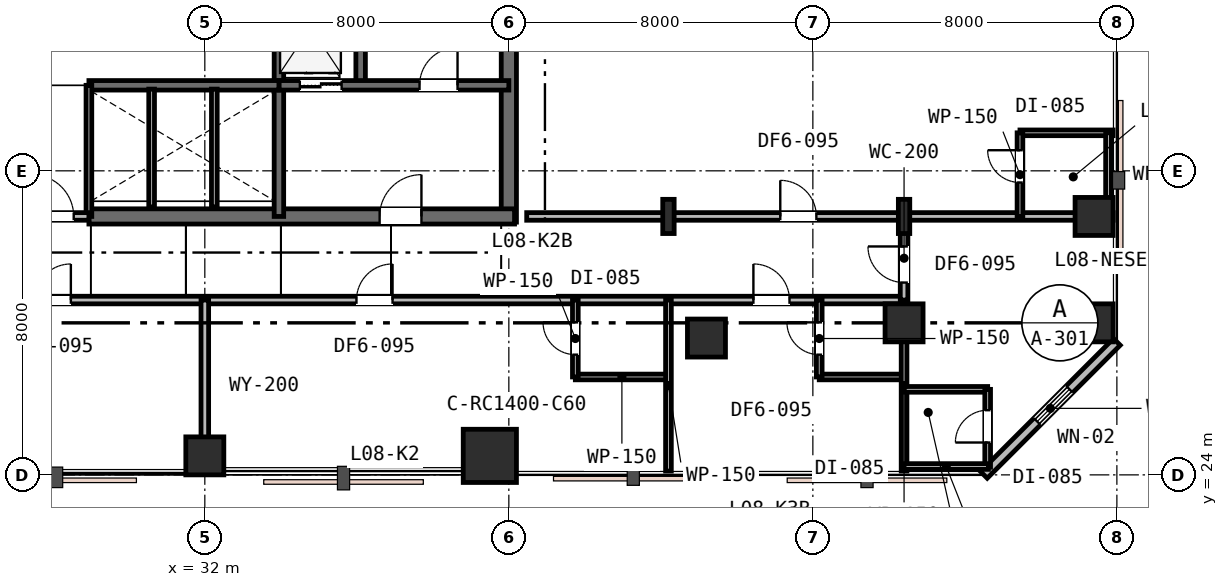
"""IFC4 building model, lengths in metres.
Left out: names, types, materials, properties, quantities, classifications, styles, units other than length and angle.
Written with IfcOpenShell. Run it as: python <this file> out.ifc"""

import sys

from ifc_helpers import new_model, si_unit, direction, frame, frame_2d, origin, origin_2d, place, context, subcontext, project, spatial, rectangle, i_section, extrude, element, fill, save


model = new_model("IFC4")
c1 = context("Model", 3, precision=1e-05, world=origin(), true_north=direction((0.0, 1.0)))
c2 = subcontext(c1, "Body", "Model", "MODEL_VIEW")
j1 = project(units=[si_unit("LENGTHUNIT", "METRE"), si_unit("PLANEANGLEUNIT", "RADIAN")], contexts=[c1])
p1 = place(None, origin())
s1 = spatial("IfcSite", under=j1, at=p1, CompositionType="ELEMENT")
p2 = place(p1, origin())
s2 = spatial("IfcBuilding", under=s1, at=p2, CompositionType="ELEMENT")
p3 = place(p2, frame((0.0, 0.0, 36.6)))
s3 = spatial("IfcBuildingStorey", under=s2, at=p3, CompositionType="ELEMENT", Elevation=36.6)
p4 = place(p3, frame((40.0, 30.65, 0.0), z_axis=(0.0, 0.0, 1.0), x_axis=(0.0, 1.0, 0.0)))
e1 = element("IfcWall", 1, at=p4, inside=s3, PredefinedType="SHEAR", context=c2, shape_type="SweptSolid", body=[
    extrude(rectangle(XDim=12.3, YDim=0.4, at=frame_2d((6.15, 0.0))), origin(), (0.0, 0.0, 1.0), 3.6),
])
p5 = place(p3, frame((28.95, 30.8, 0.0), z_axis=(0.0, 0.0, 1.0), x_axis=(1.0, 0.0, 0.0)))
e2 = element("IfcWall", 2, at=p5, inside=s3, PredefinedType="SHEAR", context=c2, shape_type="SweptSolid", body=[
    extrude(rectangle(XDim=11.2, YDim=0.4, at=frame_2d((5.6, 0.0))), origin(), (0.0, 0.0, 1.0), 3.6),
])
p6 = place(p5, frame((7.65, 0.0, 0.0)))
e3 = element("IfcOpeningElement", 3, at=p6, cuts=e2, PredefinedType="OPENING", context=c2, shape_type="SweptSolid", body=[
    extrude(rectangle(XDim=1.1, YDim=2.15, at=frame_2d((0.55, 1.075))), frame((0.0, 0.21, 0.0), z_axis=(0.0, -1.0, 0.0), x_axis=(1.0, 0.0, 0.0)), (0.0, 0.0, 1.0), 0.42),
])
p7 = place(p3, frame((36.1, 34.25, 0.0), z_axis=(0.0, 0.0, 1.0), x_axis=(0.0, 1.0, 0.0)))
e4 = element("IfcWall", 4, at=p7, inside=s3, PredefinedType="SHEAR", context=c2, shape_type="SweptSolid", body=[
    extrude(rectangle(XDim=8.65, YDim=0.25, at=frame_2d((4.325, 0.0))), origin(), (0.0, 0.0, 1.0), 3.6),
])
p8 = place(p3, frame((33.95, 30.8, 0.0), z_axis=(0.0, 0.0, 1.0), x_axis=(0.0, 1.0, 0.0)))
e5 = element("IfcWall", 5, at=p8, inside=s3, PredefinedType="SHEAR", context=c2, shape_type="SweptSolid", body=[
    extrude(rectangle(XDim=6.45, YDim=0.25, at=frame_2d((3.225, 0.0))), origin(), (0.0, 0.0, 1.0), 3.6),
])
p9 = place(p3, frame((33.95, 34.25, 0.0), z_axis=(0.0, 0.0, 1.0), x_axis=(1.0, 0.0, 0.0)))
e6 = element("IfcWall", 6, at=p9, inside=s3, PredefinedType="SHEAR", context=c2, shape_type="SweptSolid", body=[
    extrude(rectangle(XDim=6.05, YDim=0.25, at=frame_2d((3.025, 0.0))), origin(), (0.0, 0.0, 1.0), 3.6),
])
p10 = place(p9, frame((3.7, 0.0, 0.0)))
e7 = element("IfcOpeningElement", 7, at=p10, cuts=e6, PredefinedType="OPENING", context=c2, shape_type="SweptSolid", body=[
    extrude(rectangle(XDim=1.0, YDim=2.15, at=frame_2d((0.5, 1.075))), frame((0.0, 0.135, 0.0), z_axis=(0.0, -1.0, 0.0), x_axis=(1.0, 0.0, 0.0)), (0.0, 0.0, 1.0), 0.27),
])
p11 = place(p9, frame((0.55, 0.0, 0.0)))
e8 = element("IfcOpeningElement", 8, at=p11, cuts=e6, PredefinedType="OPENING", context=c2, shape_type="SweptSolid", body=[
    extrude(rectangle(XDim=1.1, YDim=2.15, at=frame_2d((0.55, 1.075))), frame((0.0, 0.135, 0.0), z_axis=(0.0, -1.0, 0.0), x_axis=(1.0, 0.0, 0.0)), (0.0, 0.0, 1.0), 0.27),
])
p12 = place(p3, frame((28.95, 34.25, 0.0), z_axis=(0.0, 0.0, 1.0), x_axis=(1.0, 0.0, 0.0)))
e9 = element("IfcWall", 9, at=p12, inside=s3, PredefinedType="SHEAR", context=c2, shape_type="SweptSolid", body=[
    extrude(rectangle(XDim=5.0, YDim=0.25, at=frame_2d((2.5, 0.0))), origin(), (0.0, 0.0, 1.0), 3.6),
])
p13 = place(p3, frame((32.0, 24.5, 0.0), z_axis=(0.0, 0.0, 1.0), x_axis=(1.0, 0.0, 0.0)))
e10 = element("IfcColumn", 10, at=p13, inside=s3, PredefinedType="COLUMN", context=c2, shape_type="SweptSolid", body=[
    extrude(rectangle(XDim=1.0, YDim=1.0, at=origin_2d()), origin(), (0.0, 0.0, 1.0), 3.6),
])
p14 = place(p3, frame((39.5, 24.5, 0.0), z_axis=(0.0, 0.0, 1.0), x_axis=(1.0, 0.0, 0.0)))
e11 = element("IfcColumn", 11, at=p14, inside=s3, PredefinedType="COLUMN", context=c2, shape_type="SweptSolid", body=[
    extrude(rectangle(XDim=1.4, YDim=1.4, at=origin_2d()), origin(), (0.0, 0.0, 1.0), 3.6),
])
for number, where, z_axis, x_axis in (
    (12, (45.2, 27.6, 0.0), (0.0, 0.0, 1.0), (1.0, 0.0, 0.0)),
    (13, (50.4, 28.0, 0.0), (0.0, 0.0, 1.0), (1.0, 0.0, 0.0)),
    (14, (55.4, 28.0, 0.0), (0.0, 0.0, 1.0), (1.0, 0.0, 0.0)),
    (15, (55.4, 30.8, 0.0), (0.0, 0.0, 1.0), (1.0, 0.0, 0.0)),
):
    element("IfcColumn", number, at=place(p3, frame(where, z_axis=z_axis, x_axis=x_axis)), inside=s3, PredefinedType="COLUMN", context=c2, shape_type="SweptSolid", body=[
        extrude(rectangle(XDim=1.0, YDim=1.0, at=origin_2d()), origin(), (0.0, 0.0, 1.0), 3.6),
    ])
for number, where, z_axis, x_axis in (
    (16, (44.2, 30.8, 0.0), (0.0, 0.0, 1.0), (1.0, 0.0, 0.0)),
    (17, (50.4, 30.8, 0.0), (0.0, 0.0, 1.0), (1.0, 0.0, 0.0)),
):
    element("IfcColumn", number, at=place(p3, frame(where, z_axis=z_axis, x_axis=x_axis)), inside=s3, PredefinedType="COLUMN", context=c2, shape_type="SweptSolid", body=[
        extrude(i_section(OverallWidth=0.3, OverallDepth=0.9, WebThickness=0.018, FlangeThickness=0.035, FilletRadius=0.03, at=origin_2d()), origin(), (0.0, 0.0, 1.0), 3.6),
    ])
p15 = place(p3, frame((52.5, 24.0, 0.0), z_axis=(0.0, 0.0, 1.0), x_axis=(0.707106781187, 0.707106781187, 0.0)))
e18 = element("IfcWall", 18, at=p15, inside=s3, PredefinedType="STANDARD", context=c2, shape_type="SweptSolid", body=[
    extrude(rectangle(XDim=4.95, YDim=0.25, at=frame_2d((2.475, 0.0))), origin(), (0.0, 0.0, 1.0), 3.33),
])
p16 = place(p15, frame((1.985, 0.0, 0.85)))
e19 = element("IfcOpeningElement", 19, at=p16, cuts=e18, PredefinedType="OPENING", context=c2, shape_type="SweptSolid", body=[
    extrude(rectangle(XDim=1.2, YDim=1.6, at=frame_2d((0.6, 0.8))), frame((0.0, 0.135, 0.0), z_axis=(0.0, -1.0, 0.0), x_axis=(1.0, 0.0, 0.0)), (0.0, 0.0, 1.0), 0.27),
])
p17 = place(p3, frame((28.95, 30.8, 0.0), z_axis=(0.0, 0.0, 1.0), x_axis=(0.0, 1.0, 0.0)))
e20 = element("IfcWall", 20, at=p17, inside=s3, PredefinedType="PLUMBINGWALL", context=c2, shape_type="SweptSolid", body=[
    extrude(rectangle(XDim=3.45, YDim=0.15, at=frame_2d((1.725, 0.0))), origin(), (0.0, 0.0, 1.0), 3.33),
])
p18 = place(p3, frame((27.05, 30.8, 0.0), z_axis=(0.0, 0.0, 1.0), x_axis=(1.0, 0.0, 0.0)))
e21 = element("IfcWall", 21, at=p18, inside=s3, PredefinedType="PARTITIONING", context=c2, shape_type="SweptSolid", body=[
    extrude(rectangle(XDim=1.9, YDim=0.2, at=frame_2d((0.95, 0.0))), origin(), (0.0, 0.0, 1.0), 3.33),
])
p19 = place(p18, frame((0.4, 0.0, 0.0)))
e22 = element("IfcOpeningElement", 22, at=p19, cuts=e21, PredefinedType="OPENING", context=c2, shape_type="SweptSolid", body=[
    extrude(rectangle(XDim=1.1, YDim=2.15, at=frame_2d((0.55, 1.075))), frame((0.0, 0.11, 0.0), z_axis=(0.0, -1.0, 0.0), x_axis=(1.0, 0.0, 0.0)), (0.0, 0.0, 1.0), 0.22),
])
for number, where, z_axis, x_axis in (
    (23, (30.6, 31.05, 0.0), (0.0, 0.0, 1.0), (0.0, 1.0, 0.0)),
    (24, (32.25, 31.05, 0.0), (0.0, 0.0, 1.0), (0.0, 1.0, 0.0)),
):
    element("IfcWall", number, at=place(p3, frame(where, z_axis=z_axis, x_axis=x_axis)), inside=s3, PredefinedType="PLUMBINGWALL", context=c2, shape_type="SweptSolid", body=[
        extrude(rectangle(XDim=3.1, YDim=0.15, at=frame_2d((1.55, 0.0))), origin(), (0.0, 0.0, 1.0), 3.33),
    ])
p20 = place(p3, frame((19.6, 28.6, 0.0), z_axis=(0.0, 0.0, 1.0), x_axis=(1.0, 0.0, 0.0)))
e25 = element("IfcWall", 25, at=p20, inside=s3, PredefinedType="PARTITIONING", context=c2, shape_type="SweptSolid", body=[
    extrude(rectangle(XDim=30.8, YDim=0.2, at=frame_2d((15.4, 0.0))), origin(), (0.0, 0.0, 1.0), 2.82),
])
p21 = place(p20, frame((7.925, 0.0, 0.0)))
e26 = element("IfcOpeningElement", 26, at=p21, cuts=e25, PredefinedType="OPENING", context=c2, shape_type="SweptSolid", body=[
    extrude(rectangle(XDim=0.95, YDim=2.15, at=frame_2d((0.475, 1.075))), frame((0.0, 0.11, 0.0), z_axis=(0.0, -1.0, 0.0), x_axis=(1.0, 0.0, 0.0)), (0.0, 0.0, 1.0), 0.22),
])
p22 = place(p20, frame((16.39, 0.0, 0.0)))
e27 = element("IfcOpeningElement", 27, at=p22, cuts=e25, PredefinedType="OPENING", context=c2, shape_type="SweptSolid", body=[
    extrude(rectangle(XDim=0.95, YDim=2.15, at=frame_2d((0.475, 1.075))), frame((0.0, 0.11, 0.0), z_axis=(0.0, -1.0, 0.0), x_axis=(1.0, 0.0, 0.0)), (0.0, 0.0, 1.0), 0.22),
])
p23 = place(p20, frame((26.835, 0.0, 0.0)))
e28 = element("IfcOpeningElement", 28, at=p23, cuts=e25, PredefinedType="OPENING", context=c2, shape_type="SweptSolid", body=[
    extrude(rectangle(XDim=0.95, YDim=2.15, at=frame_2d((0.475, 1.075))), frame((0.0, 0.11, 0.0), z_axis=(0.0, -1.0, 0.0), x_axis=(1.0, 0.0, 0.0)), (0.0, 0.0, 1.0), 0.22),
])
p24 = place(p3, frame((32.0, 24.1, 0.0), z_axis=(0.0, 0.0, 1.0), x_axis=(0.0, 1.0, 0.0)))
e29 = element("IfcWall", 29, at=p24, inside=s3, PredefinedType="PARTITIONING", context=c2, shape_type="SweptSolid", body=[
    extrude(rectangle(XDim=4.5, YDim=0.2, at=frame_2d((2.25, 0.0))), origin(), (0.0, 0.0, 1.0), 2.93),
])
p25 = place(p3, frame((41.75, 26.576, 0.0), z_axis=(0.0, 0.0, 1.0), x_axis=(1.0, 0.0, 0.0)))
e30 = element("IfcWall", 30, at=p25, inside=s3, PredefinedType="PARTITIONING", context=c2, shape_type="SweptSolid", body=[
    extrude(rectangle(XDim=2.45, YDim=0.15, at=frame_2d((1.225, 0.0))), origin(), (0.0, 0.0, 1.0), 3.33),
])
p26 = place(p3, frame((41.75, 26.576, 0.0), z_axis=(0.0, 0.0, 1.0), x_axis=(0.0, 1.0, 0.0)))
e31 = element("IfcWall", 31, at=p26, inside=s3, PredefinedType="PARTITIONING", context=c2, shape_type="SweptSolid", body=[
    extrude(rectangle(XDim=2.024, YDim=0.15, at=frame_2d((1.012, 0.0))), origin(), (0.0, 0.0, 1.0), 3.33),
])
p27 = place(p26, frame((0.587, 0.0, 0.0)))
e32 = element("IfcOpeningElement", 32, at=p27, cuts=e31, PredefinedType="OPENING", context=c2, shape_type="SweptSolid", body=[
    extrude(rectangle(XDim=0.85, YDim=2.15, at=frame_2d((0.425, 1.075))), frame((0.0, 0.085, 0.0), z_axis=(0.0, -1.0, 0.0), x_axis=(1.0, 0.0, 0.0)), (0.0, 0.0, 1.0), 0.17),
])
p28 = place(p3, frame((44.2, 28.6, 0.0), z_axis=(0.0, 0.0, 1.0), x_axis=(0.0, -1.0, 0.0)))
e33 = element("IfcWall", 33, at=p28, inside=s3, PredefinedType="PARTITIONING", context=c2, shape_type="SweptSolid", body=[
    extrude(rectangle(XDim=4.5, YDim=0.15, at=frame_2d((2.25, 0.0))), origin(), (0.0, 0.0, 1.0), 3.33),
])
p29 = place(p3, frame((48.168, 26.576, 0.0), z_axis=(0.0, 0.0, 1.0), x_axis=(1.0, 0.0, 0.0)))
e34 = element("IfcWall", 34, at=p29, inside=s3, PredefinedType="PARTITIONING", context=c2, shape_type="SweptSolid", body=[
    extrude(rectangle(XDim=2.232, YDim=0.15, at=frame_2d((1.116, 0.0))), origin(), (0.0, 0.0, 1.0), 3.33),
])
p30 = place(p3, frame((48.168, 26.576, 0.0), z_axis=(0.0, 0.0, 1.0), x_axis=(0.0, 1.0, 0.0)))
e35 = element("IfcWall", 35, at=p30, inside=s3, PredefinedType="PARTITIONING", context=c2, shape_type="SweptSolid", body=[
    extrude(rectangle(XDim=2.024, YDim=0.15, at=frame_2d((1.012, 0.0))), origin(), (0.0, 0.0, 1.0), 3.33),
])
p31 = place(p30, frame((0.587, 0.0, 0.0)))
e36 = element("IfcOpeningElement", 36, at=p31, cuts=e35, PredefinedType="OPENING", context=c2, shape_type="SweptSolid", body=[
    extrude(rectangle(XDim=0.85, YDim=2.15, at=frame_2d((0.425, 1.075))), frame((0.0, 0.085, 0.0), z_axis=(0.0, -1.0, 0.0), x_axis=(1.0, 0.0, 0.0)), (0.0, 0.0, 1.0), 0.17),
])
p32 = place(p3, frame((50.4, 28.6, 0.0), z_axis=(0.0, 0.0, 1.0), x_axis=(0.0, -1.0, 0.0)))
e37 = element("IfcWall", 37, at=p32, inside=s3, PredefinedType="PARTITIONING", context=c2, shape_type="SweptSolid", body=[
    extrude(rectangle(XDim=4.5, YDim=0.15, at=frame_2d((2.25, 0.0))), origin(), (0.0, 0.0, 1.0), 2.82),
])
p33 = place(p3, frame((40.47, 30.8, 0.0), z_axis=(0.0, 0.0, 1.0), x_axis=(1.0, 0.0, 0.0)))
e38 = element("IfcWall", 38, at=p33, inside=s3, PredefinedType="PARTITIONING", context=c2, shape_type="SweptSolid", body=[
    extrude(rectangle(XDim=15.43, YDim=0.2, at=frame_2d((7.715, 0.0))), origin(), (0.0, 0.0, 1.0), 2.82),
])
p34 = place(p33, frame((6.673, 0.0, 0.0)))
e39 = element("IfcOpeningElement", 39, at=p34, cuts=e38, PredefinedType="OPENING", context=c2, shape_type="SweptSolid", body=[
    extrude(rectangle(XDim=0.95, YDim=2.15, at=frame_2d((0.475, 1.075))), frame((0.0, 0.11, 0.0), z_axis=(0.0, -1.0, 0.0), x_axis=(1.0, 0.0, 0.0)), (0.0, 0.0, 1.0), 0.22),
])
p35 = place(p3, frame((53.45, 33.0, 0.0), z_axis=(0.0, 0.0, 1.0), x_axis=(1.0, 0.0, 0.0)))
e40 = element("IfcWall", 40, at=p35, inside=s3, PredefinedType="PARTITIONING", context=c2, shape_type="SweptSolid", body=[
    extrude(rectangle(XDim=2.45, YDim=0.15, at=frame_2d((1.225, 0.0))), origin(), (0.0, 0.0, 1.0), 2.93),
])
p36 = place(p3, frame((53.45, 30.8, 0.0), z_axis=(0.0, 0.0, 1.0), x_axis=(0.0, 1.0, 0.0)))
e41 = element("IfcWall", 41, at=p36, inside=s3, PredefinedType="PARTITIONING", context=c2, shape_type="SweptSolid", body=[
    extrude(rectangle(XDim=2.2, YDim=0.15, at=frame_2d((1.1, 0.0))), origin(), (0.0, 0.0, 1.0), 2.82),
])
p37 = place(p36, frame((0.892, 0.0, 0.0)))
e42 = element("IfcOpeningElement", 42, at=p37, cuts=e41, PredefinedType="OPENING", context=c2, shape_type="SweptSolid", body=[
    extrude(rectangle(XDim=0.85, YDim=2.15, at=frame_2d((0.425, 1.075))), frame((0.0, 0.085, 0.0), z_axis=(0.0, -1.0, 0.0), x_axis=(1.0, 0.0, 0.0)), (0.0, 0.0, 1.0), 0.17),
])
p38 = place(p3, frame((55.78, 33.0, 0.0), z_axis=(0.0, 0.0, 1.0), x_axis=(0.0, -1.0, 0.0)))
e43 = element("IfcWall", 43, at=p38, inside=s3, PredefinedType="PARTITIONING", context=c2, shape_type="SweptSolid", body=[
    extrude(rectangle(XDim=2.2, YDim=0.15, at=frame_2d((1.1, 0.0))), origin(), (0.0, 0.0, 1.0), 2.82),
])
p39 = place(p3, frame((50.4, 28.6, 0.0), z_axis=(0.0, 0.0, 1.0), x_axis=(0.0, 1.0, 0.0)))
e44 = element("IfcWall", 44, at=p39, inside=s3, PredefinedType="PARTITIONING", context=c2, shape_type="SweptSolid", body=[
    extrude(rectangle(XDim=2.2, YDim=0.2, at=frame_2d((1.1, 0.0))), origin(), (0.0, 0.0, 1.0), 2.82),
])
p40 = place(p39, frame((0.46, 0.0, 0.0)))
e45 = element("IfcOpeningElement", 45, at=p40, cuts=e44, PredefinedType="OPENING", context=c2, shape_type="SweptSolid", body=[
    extrude(rectangle(XDim=0.95, YDim=2.15, at=frame_2d((0.475, 1.075))), frame((0.0, 0.11, 0.0), z_axis=(0.0, -1.0, 0.0), x_axis=(1.0, 0.0, 0.0)), (0.0, 0.0, 1.0), 0.22),
])
p41 = place(p3, frame((50.4, 26.25, 0.0), z_axis=(0.0, 0.0, 1.0), x_axis=(1.0, 0.0, 0.0)))
e46 = element("IfcWall", 46, at=p41, inside=s3, PredefinedType="PARTITIONING", context=c2, shape_type="SweptSolid", body=[
    extrude(rectangle(XDim=2.2, YDim=0.15, at=frame_2d((1.1, 0.0))), origin(), (0.0, 0.0, 1.0), 3.33),
])
p42 = place(p3, frame((52.6, 24.2, 0.0), z_axis=(0.0, 0.0, 1.0), x_axis=(0.0, 1.0, 0.0)))
e47 = element("IfcWall", 47, at=p42, inside=s3, PredefinedType="PARTITIONING", context=c2, shape_type="SweptSolid", body=[
    extrude(rectangle(XDim=2.05, YDim=0.15, at=frame_2d((1.025, 0.0))), origin(), (0.0, 0.0, 1.0), 3.33),
])
p43 = place(p42, frame((0.651, 0.0, 0.0)))
e48 = element("IfcOpeningElement", 48, at=p43, cuts=e47, PredefinedType="OPENING", context=c2, shape_type="SweptSolid", body=[
    extrude(rectangle(XDim=0.85, YDim=2.15, at=frame_2d((0.425, 1.075))), frame((0.0, 0.085, 0.0), z_axis=(0.0, -1.0, 0.0), x_axis=(1.0, 0.0, 0.0)), (0.0, 0.0, 1.0), 0.17),
])
p44 = place(p3, frame((52.62, 24.22, 0.0), z_axis=(0.0, 0.0, 1.0), x_axis=(-1.0, 0.0, 0.0)))
e49 = element("IfcWall", 49, at=p44, inside=s3, PredefinedType="PARTITIONING", context=c2, shape_type="SweptSolid", body=[
    extrude(rectangle(XDim=2.22, YDim=0.15, at=frame_2d((1.11, 0.0))), origin(), (0.0, 0.0, 1.0), 3.33),
])
p45 = place(p16, origin())
e50 = element("IfcWindow", 50, at=p45, inside=s3, PartitioningType="SINGLE_PANEL", PredefinedType="WINDOW", context=c2, shape_type="SweptSolid", body=[
    extrude(rectangle(XDim=1.2, YDim=1.6, at=frame_2d((0.6, 0.8))), frame((0.0, 0.03, 0.0), z_axis=(0.0, -1.0, 0.0), x_axis=(1.0, 0.0, 0.0)), (0.0, 0.0, 1.0), 0.06),
])
fill(e19, e50)
p46 = place(p19, origin())
e51 = element("IfcDoor", 51, at=p46, inside=s3, OperationType="SINGLE_SWING_LEFT", PredefinedType="DOOR", context=c2, shape_type="SweptSolid", body=[
    extrude(rectangle(XDim=1.1, YDim=2.15, at=frame_2d((0.55, 1.075))), frame((0.0, 0.025, 0.0), z_axis=(0.0, -1.0, 0.0), x_axis=(1.0, 0.0, 0.0)), (0.0, 0.0, 1.0), 0.05),
])
fill(e22, e51)
p47 = place(p10, origin())
e52 = element("IfcDoor", 52, at=p47, inside=s3, OperationType="SINGLE_SWING_RIGHT", PredefinedType="DOOR", context=c2, shape_type="SweptSolid", body=[
    extrude(rectangle(XDim=1.0, YDim=2.15, at=frame_2d((0.5, 1.075))), frame((0.0, 0.025, 0.0), z_axis=(0.0, -1.0, 0.0), x_axis=(1.0, 0.0, 0.0)), (0.0, 0.0, 1.0), 0.05),
])
fill(e7, e52)
p48 = place(p6, origin())
e53 = element("IfcDoor", 53, at=p48, inside=s3, OperationType="SINGLE_SWING_RIGHT", PredefinedType="DOOR", context=c2, shape_type="SweptSolid", body=[
    extrude(rectangle(XDim=1.1, YDim=2.15, at=frame_2d((0.55, 1.075))), frame((0.0, 0.025, 0.0), z_axis=(0.0, -1.0, 0.0), x_axis=(1.0, 0.0, 0.0)), (0.0, 0.0, 1.0), 0.05),
])
fill(e3, e53)
p49 = place(p21, origin())
e54 = element("IfcDoor", 54, at=p49, inside=s3, OperationType="SINGLE_SWING_RIGHT", PredefinedType="DOOR", context=c2, shape_type="SweptSolid", body=[
    extrude(rectangle(XDim=0.95, YDim=2.15, at=frame_2d((0.475, 1.075))), frame((0.0, 0.025, 0.0), z_axis=(0.0, -1.0, 0.0), x_axis=(1.0, 0.0, 0.0)), (0.0, 0.0, 1.0), 0.05),
])
fill(e26, e54)
p50 = place(p22, origin())
e55 = element("IfcDoor", 55, at=p50, inside=s3, OperationType="SINGLE_SWING_RIGHT", PredefinedType="DOOR", context=c2, shape_type="SweptSolid", body=[
    extrude(rectangle(XDim=0.95, YDim=2.15, at=frame_2d((0.475, 1.075))), frame((0.0, 0.025, 0.0), z_axis=(0.0, -1.0, 0.0), x_axis=(1.0, 0.0, 0.0)), (0.0, 0.0, 1.0), 0.05),
])
fill(e27, e55)
p51 = place(p27, origin())
e56 = element("IfcDoor", 56, at=p51, inside=s3, OperationType="SINGLE_SWING_RIGHT", PredefinedType="DOOR", context=c2, shape_type="SweptSolid", body=[
    extrude(rectangle(XDim=0.85, YDim=2.15, at=frame_2d((0.425, 1.075))), frame((0.0, 0.025, 0.0), z_axis=(0.0, -1.0, 0.0), x_axis=(1.0, 0.0, 0.0)), (0.0, 0.0, 1.0), 0.05),
])
fill(e32, e56)
p52 = place(p23, origin())
e57 = element("IfcDoor", 57, at=p52, inside=s3, OperationType="SINGLE_SWING_LEFT", PredefinedType="DOOR", context=c2, shape_type="SweptSolid", body=[
    extrude(rectangle(XDim=0.95, YDim=2.15, at=frame_2d((0.475, 1.075))), frame((0.0, 0.025, 0.0), z_axis=(0.0, -1.0, 0.0), x_axis=(1.0, 0.0, 0.0)), (0.0, 0.0, 1.0), 0.05),
])
fill(e28, e57)
p53 = place(p31, origin())
e58 = element("IfcDoor", 58, at=p53, inside=s3, OperationType="SINGLE_SWING_RIGHT", PredefinedType="DOOR", context=c2, shape_type="SweptSolid", body=[
    extrude(rectangle(XDim=0.85, YDim=2.15, at=frame_2d((0.425, 1.075))), frame((0.0, 0.025, 0.0), z_axis=(0.0, -1.0, 0.0), x_axis=(1.0, 0.0, 0.0)), (0.0, 0.0, 1.0), 0.05),
])
fill(e36, e58)
p54 = place(p34, origin())
e59 = element("IfcDoor", 59, at=p54, inside=s3, OperationType="SINGLE_SWING_LEFT", PredefinedType="DOOR", context=c2, shape_type="SweptSolid", body=[
    extrude(rectangle(XDim=0.95, YDim=2.15, at=frame_2d((0.475, 1.075))), frame((0.0, 0.025, 0.0), z_axis=(0.0, -1.0, 0.0), x_axis=(1.0, 0.0, 0.0)), (0.0, 0.0, 1.0), 0.05),
])
fill(e39, e59)
p55 = place(p37, origin())
e60 = element("IfcDoor", 60, at=p55, inside=s3, OperationType="SINGLE_SWING_RIGHT", PredefinedType="DOOR", context=c2, shape_type="SweptSolid", body=[
    extrude(rectangle(XDim=0.85, YDim=2.15, at=frame_2d((0.425, 1.075))), frame((0.0, 0.025, 0.0), z_axis=(0.0, -1.0, 0.0), x_axis=(1.0, 0.0, 0.0)), (0.0, 0.0, 1.0), 0.05),
])
fill(e42, e60)
p56 = place(p40, origin())
e61 = element("IfcDoor", 61, at=p56, inside=s3, OperationType="SINGLE_SWING_RIGHT", PredefinedType="DOOR", context=c2, shape_type="SweptSolid", body=[
    extrude(rectangle(XDim=0.95, YDim=2.15, at=frame_2d((0.475, 1.075))), frame((0.0, 0.025, 0.0), z_axis=(0.0, -1.0, 0.0), x_axis=(1.0, 0.0, 0.0)), (0.0, 0.0, 1.0), 0.05),
])
fill(e45, e61)
p57 = place(p43, origin())
e62 = element("IfcDoor", 62, at=p57, inside=s3, OperationType="SINGLE_SWING_LEFT", PredefinedType="DOOR", context=c2, shape_type="SweptSolid", body=[
    extrude(rectangle(XDim=0.85, YDim=2.15, at=frame_2d((0.425, 1.075))), frame((0.0, 0.025, 0.0), z_axis=(0.0, -1.0, 0.0), x_axis=(1.0, 0.0, 0.0)), (0.0, 0.0, 1.0), 0.05),
])
fill(e48, e62)
p58 = place(p11, origin())
e63 = element("IfcDoor", 63, at=p58, inside=s3, OperationType="DOUBLE_DOOR_SLIDING", PredefinedType="DOOR", context=c2, shape_type="SweptSolid", body=[
    extrude(rectangle(XDim=1.1, YDim=2.15, at=frame_2d((0.55, 1.075))), frame((0.0, 0.025, 0.0), z_axis=(0.0, -1.0, 0.0), x_axis=(1.0, 0.0, 0.0)), (0.0, 0.0, 1.0), 0.05),
])
fill(e8, e63)
save(model, sys.argv[1])
